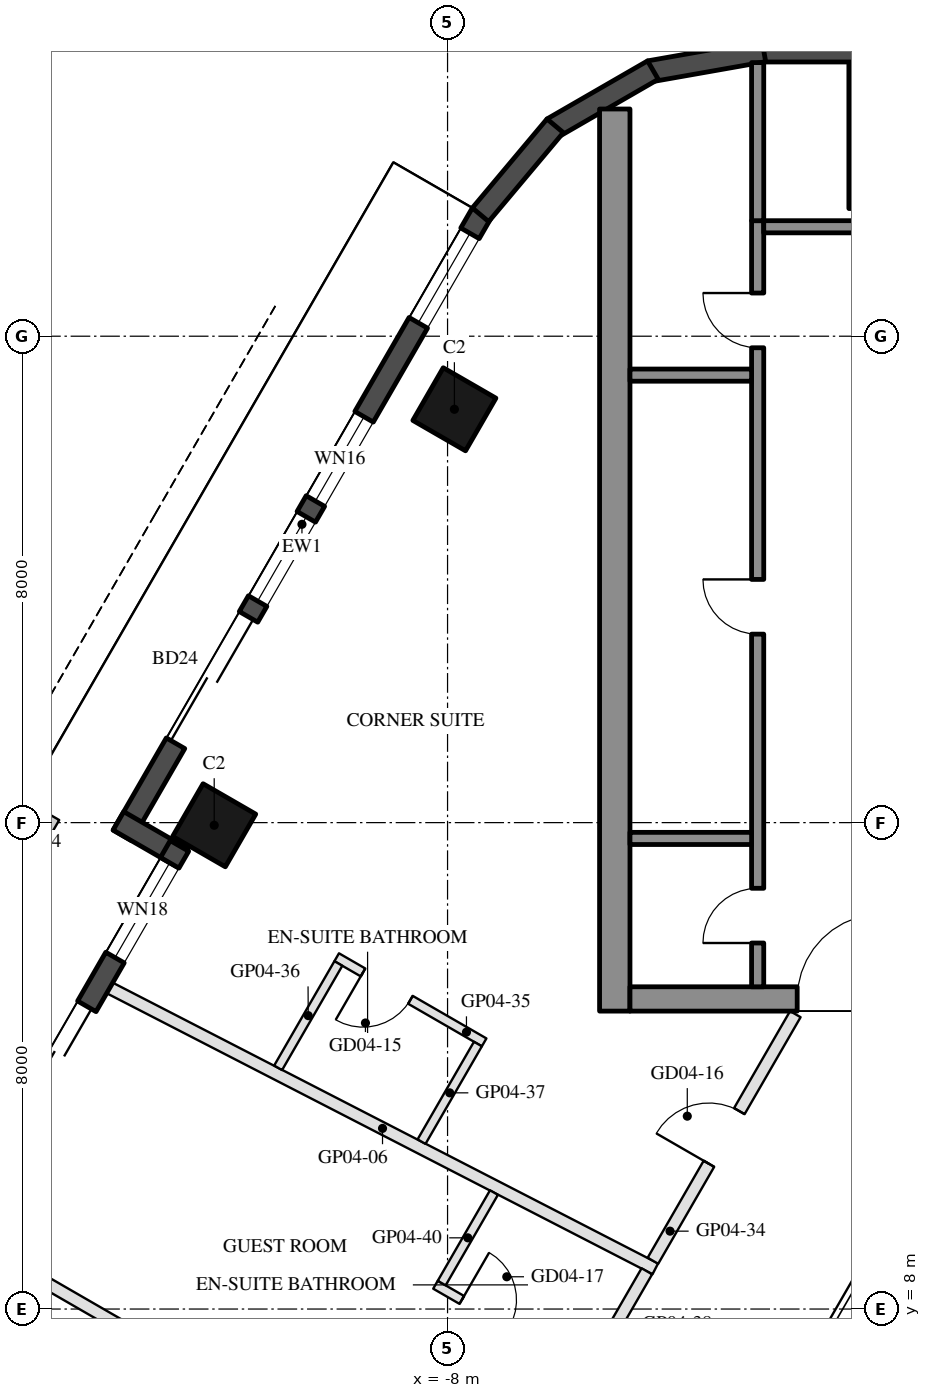
"""IFC4 building model, lengths in metres.
Left out: names, types, materials, properties, quantities, classifications, styles, units other than length and angle.
Written with IfcOpenShell. Run it as: python <this file> out.ifc"""

import sys

from ifc_helpers import new_model, si_unit, direction, frame, frame_2d, origin, origin_2d, place, context, subcontext, project, spatial, rectangle, hollow_rectangle, extrude, element, fill, save


model = new_model("IFC4")
c1 = context("Model", 3, precision=1e-05, world=origin(), true_north=direction((0.0, 1.0)))
c2 = subcontext(c1, "Body", "Model", "MODEL_VIEW")
j1 = project(units=[si_unit("LENGTHUNIT", "METRE"), si_unit("PLANEANGLEUNIT", "RADIAN")], contexts=[c1])
p1 = place(None, origin())
s1 = spatial("IfcSite", under=j1, at=p1, CompositionType="ELEMENT")
p2 = place(p1, origin())
s2 = spatial("IfcBuilding", under=s1, at=p2, CompositionType="ELEMENT")
p3 = place(p2, frame((0.0, 0.0, 72.4)))
s3 = spatial("IfcBuildingStorey", under=s2, at=p3, CompositionType="ELEMENT", Elevation=72.4)
for number, where, z_axis, x_axis in (
    (1, (-7.888, 22.798, 0.0), (0.0, 0.0, 1.0), (0.5, 0.866, 0.0)),
    (2, (-11.838, 15.957, 0.0), (0.0, 0.0, 1.0), (0.5, 0.866, 0.0)),
):
    element("IfcColumn", number, at=place(p3, frame(where, z_axis=z_axis, x_axis=x_axis)), inside=s3, PredefinedType="COLUMN", context=c2, shape_type="SweptSolid", body=[
        extrude(hollow_rectangle(XDim=1.0, YDim=1.0, WallThickness=0.045, at=origin_2d()), origin(), (0.0, 0.0, 1.0), 3.7),
    ])
p4 = place(p3, frame((0.0, 27.3, 0.0), z_axis=(0.0, 0.0, 1.0), x_axis=(1.0, 0.0, 0.0)))
e3 = element("IfcColumn", 3, at=p4, inside=s3, PredefinedType="COLUMN", context=c2, shape_type="SweptSolid", body=[
    extrude(hollow_rectangle(XDim=2.8, YDim=2.4, WallThickness=0.07, at=origin_2d()), origin(), (0.0, 0.0, 1.0), 3.7),
])
p5 = place(p3, frame((-7.441, 26.022, 0.0), z_axis=(0.0, 0.0, 1.0), x_axis=(-0.499992533062, -0.86602971478, 0.0)))
e4 = element("IfcWall", 4, at=p5, inside=s3, PredefinedType="SOLIDWALL", context=c2, shape_type="SweptSolid", body=[
    extrude(rectangle(XDim=11.816, YDim=0.35, at=frame_2d((5.908, 0.0))), origin(), (0.0, 0.0, 1.0), 3.55),
])
p6 = place(p5, frame((0.381, 0.0, 0.3)))
e5 = element("IfcOpeningElement", 5, at=p6, cuts=e4, PredefinedType="OPENING", context=c2, shape_type="SweptSolid", body=[
    extrude(rectangle(XDim=1.7, YDim=2.65, at=frame_2d((0.85, 1.325))), frame((0.0, 0.185, 0.0), z_axis=(0.0, -1.0, 0.0), x_axis=(1.0, 0.0, 0.0)), (0.0, 0.0, 1.0), 0.37),
])
p7 = place(p5, frame((7.666, 0.0, 0.0)))
e6 = element("IfcOpeningElement", 6, at=p7, cuts=e4, PredefinedType="OPENING", context=c2, shape_type="SweptSolid", body=[
    extrude(rectangle(XDim=2.4, YDim=2.4, at=frame_2d((1.2, 1.2))), frame((0.0, 0.185, 0.0), z_axis=(0.0, -1.0, 0.0), x_axis=(1.0, 0.0, 0.0)), (0.0, 0.0, 1.0), 0.37),
])
p8 = place(p5, frame((3.865, 0.0, 0.3)))
e7 = element("IfcOpeningElement", 7, at=p8, cuts=e4, PredefinedType="OPENING", context=c2, shape_type="SweptSolid", body=[
    extrude(rectangle(XDim=1.6, YDim=2.65, at=frame_2d((0.8, 1.325))), frame((0.0, 0.185, 0.0), z_axis=(0.0, -1.0, 0.0), x_axis=(1.0, 0.0, 0.0)), (0.0, 0.0, 1.0), 0.37),
])
p9 = place(p5, frame((5.765, 0.0, 0.3)))
e8 = element("IfcOpeningElement", 8, at=p9, cuts=e4, PredefinedType="OPENING", context=c2, shape_type="SweptSolid", body=[
    extrude(rectangle(XDim=1.6, YDim=2.65, at=frame_2d((0.8, 1.325))), frame((0.0, 0.185, 0.0), z_axis=(0.0, -1.0, 0.0), x_axis=(1.0, 0.0, 0.0)), (0.0, 0.0, 1.0), 0.37),
])
p10 = place(p3, frame((-13.413, 16.029, 0.0), z_axis=(0.0, 0.0, 1.0), x_axis=(0.866005645448, -0.500034220881, 0.0)))
e9 = element("IfcWall", 9, at=p10, inside=s3, PredefinedType="SOLIDWALL", context=c2, shape_type="SweptSolid", body=[
    extrude(rectangle(XDim=1.22, YDim=0.35, at=frame_2d((0.61, 0.0))), origin(), (0.0, 0.0, 1.0), 3.55),
])
p11 = place(p3, frame((-12.409, 15.617, 0.0), z_axis=(0.0, 0.0, 1.0), x_axis=(-0.500003597184, -0.866023326939, 0.0)))
e10 = element("IfcWall", 10, at=p11, inside=s3, PredefinedType="SOLIDWALL", context=c2, shape_type="SweptSolid", body=[
    extrude(rectangle(XDim=6.74, YDim=0.35, at=frame_2d((3.37, 0.0))), origin(), (0.0, 0.0, 1.0), 3.55),
])
p12 = place(p11, frame((0.32, 0.0, 0.3)))
e11 = element("IfcOpeningElement", 11, at=p12, cuts=e10, PredefinedType="OPENING", context=c2, shape_type="SweptSolid", body=[
    extrude(rectangle(XDim=1.8, YDim=2.65, at=frame_2d((0.9, 1.325))), frame((0.0, 0.185, 0.0), z_axis=(0.0, -1.0, 0.0), x_axis=(1.0, 0.0, 0.0)), (0.0, 0.0, 1.0), 0.37),
])
p13 = place(p11, frame((3.047, 0.0, 0.0)))
e12 = element("IfcOpeningElement", 12, at=p13, cuts=e10, PredefinedType="OPENING", context=c2, shape_type="SweptSolid", body=[
    extrude(rectangle(XDim=1.8, YDim=2.4, at=frame_2d((0.9, 1.2))), frame((0.0, 0.185, 0.0), z_axis=(0.0, -1.0, 0.0), x_axis=(1.0, 0.0, 0.0)), (0.0, 0.0, 1.0), 0.37),
])
p14 = place(p11, frame((5.147, 0.0, 0.3)))
e13 = element("IfcOpeningElement", 13, at=p14, cuts=e10, PredefinedType="OPENING", context=c2, shape_type="SweptSolid", body=[
    extrude(rectangle(XDim=0.8, YDim=2.65, at=frame_2d((0.4, 1.325))), frame((0.0, 0.185, 0.0), z_axis=(0.0, -1.0, 0.0), x_axis=(1.0, 0.0, 0.0)), (0.0, 0.0, 1.0), 0.37),
])
p15 = place(p3, frame((2.829, 28.685, 0.0), z_axis=(0.0, 0.0, 1.0), x_axis=(-1.0, 0.0, 0.0)))
e14 = element("IfcWall", 14, at=p15, inside=s3, PredefinedType="SOLIDWALL", context=c2, shape_type="SweptSolid", body=[
    extrude(rectangle(XDim=5.658, YDim=0.35, at=frame_2d((2.829, 0.0))), origin(), (0.0, 0.0, 1.0), 3.55),
])
for number, where, z_axis, x_axis in (
    (15, (-2.799, 28.688, 0.0), (0.0, 0.0, 1.0), (-0.985, -0.174, 0.0)),
    (16, (-4.623, 28.377, 0.0), (0.0, 0.0, 1.0), (-0.866, -0.5, 0.0)),
):
    element("IfcWall", number, at=place(p3, frame(where, z_axis=z_axis, x_axis=x_axis)), inside=s3, PredefinedType="SOLIDWALL", context=c2, shape_type="SweptSolid", body=[
        extrude(rectangle(XDim=1.91, YDim=0.35, at=frame_2d((0.955, 0.0))), origin(), (0.0, 0.0, 1.0), 3.55),
    ])
p16 = place(p3, frame((-6.23, 27.461, 0.0), z_axis=(0.0, 0.0, 1.0), x_axis=(-0.642808304945, -0.766027077259, 0.0)))
e17 = element("IfcWall", 17, at=p16, inside=s3, PredefinedType="SOLIDWALL", context=c2, shape_type="SweptSolid", body=[
    extrude(rectangle(XDim=1.91, YDim=0.35, at=frame_2d((0.955, 0.0))), origin(), (0.0, 0.0, 1.0), 3.55),
])
p17 = place(p3, frame((-5.25, 12.9, 0.0), z_axis=(0.0, 0.0, 1.0), x_axis=(0.0, 1.0, 0.0)))
e18 = element("IfcWall", 18, at=p17, inside=s3, PredefinedType="SHEAR", context=c2, shape_type="SweptSolid", body=[
    extrude(rectangle(XDim=14.837, YDim=0.5, at=frame_2d((7.418, 0.0))), origin(), (0.0, 0.0, 1.0), 3.5),
])
p18 = place(p3, frame((5.0, 13.1, 0.0), z_axis=(0.0, 0.0, 1.0), x_axis=(-1.0, 0.0, 0.0)))
e19 = element("IfcWall", 19, at=p18, inside=s3, PredefinedType="SHEAR", context=c2, shape_type="SweptSolid", body=[
    extrude(rectangle(XDim=10.0, YDim=0.4, at=frame_2d((5.0, 0.0))), origin(), (0.0, 0.0, 1.0), 3.5),
])
p19 = place(p18, frame((3.55, 0.0, 0.0)))
e20 = element("IfcOpeningElement", 20, at=p19, cuts=e19, PredefinedType="OPENING", context=c2, shape_type="SweptSolid", body=[
    extrude(rectangle(XDim=1.1, YDim=2.1, at=frame_2d((0.55, 1.05))), frame((0.0, 0.21, 0.0), z_axis=(0.0, -1.0, 0.0), x_axis=(1.0, 0.0, 0.0)), (0.0, 0.0, 1.0), 0.42),
])
p20 = place(p18, frame((5.85, 0.0, 0.0)))
e21 = element("IfcOpeningElement", 21, at=p20, cuts=e19, PredefinedType="OPENING", context=c2, shape_type="SweptSolid", body=[
    extrude(rectangle(XDim=1.4, YDim=2.1, at=frame_2d((0.7, 1.05))), frame((0.0, 0.21, 0.0), z_axis=(0.0, -1.0, 0.0), x_axis=(1.0, 0.0, 0.0)), (0.0, 0.0, 1.0), 0.42),
])
p21 = place(p3, frame((-2.9, 13.3, 0.0), z_axis=(0.0, 0.0, 1.0), x_axis=(0.0, 1.0, 0.0)))
e22 = element("IfcWall", 22, at=p21, inside=s3, PredefinedType="SHEAR", context=c2, shape_type="SweptSolid", body=[
    extrude(rectangle(XDim=12.6, YDim=0.2, at=frame_2d((6.3, 0.0))), origin(), (0.0, 0.0, 1.0), 3.5),
])
p22 = place(p21, frame((0.72, 0.0, 0.0)))
e23 = element("IfcOpeningElement", 23, at=p22, cuts=e22, PredefinedType="OPENING", context=c2, shape_type="SweptSolid", body=[
    extrude(rectangle(XDim=0.9, YDim=2.1, at=frame_2d((0.45, 1.05))), frame((0.0, 0.11, 0.0), z_axis=(0.0, -1.0, 0.0), x_axis=(1.0, 0.0, 0.0)), (0.0, 0.0, 1.0), 0.22),
])
p23 = place(p21, frame((5.8, 0.0, 0.0)))
e24 = element("IfcOpeningElement", 24, at=p23, cuts=e22, PredefinedType="OPENING", context=c2, shape_type="SweptSolid", body=[
    extrude(rectangle(XDim=0.9, YDim=2.1, at=frame_2d((0.45, 1.05))), frame((0.0, 0.11, 0.0), z_axis=(0.0, -1.0, 0.0), x_axis=(1.0, 0.0, 0.0)), (0.0, 0.0, 1.0), 0.22),
])
p24 = place(p21, frame((10.51, 0.0, 0.0)))
e25 = element("IfcOpeningElement", 25, at=p24, cuts=e22, PredefinedType="OPENING", context=c2, shape_type="SweptSolid", body=[
    extrude(rectangle(XDim=0.9, YDim=2.1, at=frame_2d((0.45, 1.05))), frame((0.0, 0.11, 0.0), z_axis=(0.0, -1.0, 0.0), x_axis=(1.0, 0.0, 0.0)), (0.0, 0.0, 1.0), 0.22),
])
p25 = place(p3, frame((-0.4, 25.8, 0.0), z_axis=(0.0, 0.0, 1.0), x_axis=(-1.0, 0.0, 0.0)))
e26 = element("IfcWall", 26, at=p25, inside=s3, PredefinedType="SHEAR", context=c2, shape_type="SweptSolid", body=[
    extrude(rectangle(XDim=2.4, YDim=0.2, at=frame_2d((1.2, 0.0))), origin(), (0.0, 0.0, 1.0), 3.5),
])
for number, where, z_axis, x_axis in (
    (27, (-3.0, 15.74, 0.0), (0.0, 0.0, 1.0), (-1.0, 0.0, 0.0)),
    (28, (-3.0, 23.36, 0.0), (0.0, 0.0, 1.0), (-1.0, 0.0, 0.0)),
):
    element("IfcWall", number, at=place(p3, frame(where, z_axis=z_axis, x_axis=x_axis)), inside=s3, PredefinedType="SHEAR", context=c2, shape_type="SweptSolid", body=[
        extrude(rectangle(XDim=2.0, YDim=0.2, at=frame_2d((1.0, 0.0))), origin(), (0.0, 0.0, 1.0), 3.5),
    ])
p26 = place(p3, frame((-2.9, 25.9, 0.0), z_axis=(0.0, 0.0, 1.0), x_axis=(0.0, 1.0, 0.0)))
e29 = element("IfcWall", 29, at=p26, inside=s3, PredefinedType="SHEAR", context=c2, shape_type="SweptSolid", body=[
    extrude(rectangle(XDim=2.6, YDim=0.2, at=frame_2d((1.3, 0.0))), origin(), (0.0, 0.0, 1.0), 3.5),
])
p27 = place(p3, frame((-13.556, 13.281, 0.0), z_axis=(0.0, 0.0, 1.0), x_axis=(0.889110909618, -0.457691807223, 0.0)))
e30 = element("IfcWall", 30, at=p27, inside=s3, PredefinedType="PARTITIONING", context=c2, shape_type="SweptSolid", body=[
    extrude(rectangle(XDim=10.092, YDim=0.2, at=frame_2d((5.046, 0.0))), origin(), (0.0, 0.0, 1.0), 2.96),
])
p28 = place(p3, frame((-15.354, 8.865, 0.0), z_axis=(0.0, 0.0, 1.0), x_axis=(0.866018301787, -0.500012300819, 0.0)))
e31 = element("IfcWall", 31, at=p28, inside=s3, PredefinedType="PARTITIONING", context=c2, shape_type="SweptSolid", body=[
    extrude(rectangle(XDim=9.43, YDim=0.2, at=frame_2d((4.715, 0.0))), origin(), (0.0, 0.0, 1.0), 2.95),
])
p29 = place(p3, frame((-4.622, 8.794, 0.0), z_axis=(0.0, 0.0, 1.0), x_axis=(0.499979668266, 0.866037141998, 0.0)))
e32 = element("IfcWall", 32, at=p29, inside=s3, PredefinedType="PARTITIONING", context=c2, shape_type="SweptSolid", body=[
    extrude(rectangle(XDim=4.683, YDim=0.2, at=frame_2d((2.342, 0.0))), origin(), (0.0, 0.0, 1.0), 2.95),
])
p30 = place(p29, frame((1.842, 0.0, 0.0)))
e33 = element("IfcOpeningElement", 33, at=p30, cuts=e32, PredefinedType="OPENING", context=c2, shape_type="SweptSolid", body=[
    extrude(rectangle(XDim=1.0, YDim=2.1, at=frame_2d((0.5, 1.05))), frame((0.0, 0.11, 0.0), z_axis=(0.0, -1.0, 0.0), x_axis=(1.0, 0.0, 0.0)), (0.0, 0.0, 1.0), 0.22),
])
p31 = place(p3, frame((-7.398, 12.386, 0.0), z_axis=(0.0, 0.0, 1.0), x_axis=(-0.866034573852, 0.49998411664, 0.0)))
e34 = element("IfcWall", 34, at=p31, inside=s3, PredefinedType="PARTITIONING", context=c2, shape_type="SweptSolid", body=[
    extrude(rectangle(XDim=2.8, YDim=0.15, at=frame_2d((1.4, 0.0))), origin(), (0.0, 0.0, 1.0), 3.55),
])
p32 = place(p31, frame((1.4, 0.0, 0.0)))
e35 = element("IfcOpeningElement", 35, at=p32, cuts=e34, PredefinedType="OPENING", context=c2, shape_type="SweptSolid", body=[
    extrude(rectangle(XDim=0.9, YDim=2.1, at=frame_2d((0.45, 1.05))), frame((0.0, 0.085, 0.0), z_axis=(0.0, -1.0, 0.0), x_axis=(1.0, 0.0, 0.0)), (0.0, 0.0, 1.0), 0.17),
])
p33 = place(p3, frame((-9.796, 13.683, 0.0), z_axis=(0.0, 0.0, 1.0), x_axis=(-0.499981976687, -0.866035809299, 0.0)))
e36 = element("IfcWall", 36, at=p33, inside=s3, PredefinedType="PARTITIONING", context=c2, shape_type="SweptSolid", body=[
    extrude(rectangle(XDim=1.981, YDim=0.15, at=frame_2d((0.991, 0.0))), origin(), (0.0, 0.0, 1.0), 3.55),
])
p34 = place(p3, frame((-7.501, 12.358, 0.0), z_axis=(0.0, 0.0, 1.0), x_axis=(-0.499992292652, -0.866029853578, 0.0)))
e37 = element("IfcWall", 37, at=p34, inside=s3, PredefinedType="PARTITIONING", context=c2, shape_type="SweptSolid", body=[
    extrude(rectangle(XDim=1.854, YDim=0.15, at=frame_2d((0.927, 0.0))), origin(), (0.0, 0.0, 1.0), 3.55),
])
p35 = place(p3, frame((-7.225, 4.287, 0.0), z_axis=(0.0, 0.0, 1.0), x_axis=(0.49997441339, 0.866040175716, 0.0)))
e38 = element("IfcWall", 38, at=p35, inside=s3, PredefinedType="PARTITIONING", context=c2, shape_type="SweptSolid", body=[
    extrude(rectangle(XDim=5.005, YDim=0.2, at=frame_2d((2.502, 0.0))), origin(), (0.0, 0.0, 1.0), 2.95),
])
p36 = place(p35, frame((1.55, 0.0, 0.0)))
e39 = element("IfcOpeningElement", 39, at=p36, cuts=e38, PredefinedType="OPENING", context=c2, shape_type="SweptSolid", body=[
    extrude(rectangle(XDim=1.0, YDim=2.1, at=frame_2d((0.5, 1.05))), frame((0.0, 0.11, 0.0), z_axis=(0.0, -1.0, 0.0), x_axis=(1.0, 0.0, 0.0)), (0.0, 0.0, 1.0), 0.22),
])
p37 = place(p3, frame((-8.198, 8.399, 0.0), z_axis=(0.0, 0.0, 1.0), x_axis=(0.866034573852, -0.49998411664, 0.0)))
e40 = element("IfcWall", 40, at=p37, inside=s3, PredefinedType="PARTITIONING", context=c2, shape_type="SweptSolid", body=[
    extrude(rectangle(XDim=2.8, YDim=0.15, at=frame_2d((1.4, 0.0))), origin(), (0.0, 0.0, 1.0), 3.55),
])
p38 = place(p37, frame((0.5, 0.0, 0.0)))
e41 = element("IfcOpeningElement", 41, at=p38, cuts=e40, PredefinedType="OPENING", context=c2, shape_type="SweptSolid", body=[
    extrude(rectangle(XDim=0.9, YDim=2.1, at=frame_2d((0.45, 1.05))), frame((0.0, 0.085, 0.0), z_axis=(0.0, -1.0, 0.0), x_axis=(1.0, 0.0, 0.0)), (0.0, 0.0, 1.0), 0.17),
])
p39 = place(p3, frame((-7.237, 9.915, 0.0), z_axis=(0.0, 0.0, 1.0), x_axis=(-0.50005036918, -0.865996321171, 0.0)))
e42 = element("IfcWall", 42, at=p39, inside=s3, PredefinedType="PARTITIONING", context=c2, shape_type="SweptSolid", body=[
    extrude(rectangle(XDim=1.719, YDim=0.15, at=frame_2d((0.859, 0.0))), origin(), (0.0, 0.0, 1.0), 2.95),
])
p40 = place(p6, origin())
e43 = element("IfcWindow", 43, at=p40, inside=s3, PartitioningType="SINGLE_PANEL", PredefinedType="WINDOW", context=c2, shape_type="SweptSolid", body=[
    extrude(rectangle(XDim=1.7, YDim=2.65, at=frame_2d((0.85, 1.325))), frame((0.0, 0.03, 0.0), z_axis=(0.0, -1.0, 0.0), x_axis=(1.0, 0.0, 0.0)), (0.0, 0.0, 1.0), 0.06),
])
fill(e5, e43)
p41 = place(p7, frame((2.4, 0.0, 0.0), z_axis=(0.0, 0.0, 1.0), x_axis=(-1.0, 0.0, 0.0)))
e44 = element("IfcDoor", 44, at=p41, inside=s3, OperationType="SLIDING_TO_LEFT", PredefinedType="DOOR", context=c2, shape_type="SweptSolid", body=[
    extrude(rectangle(XDim=2.4, YDim=2.4, at=frame_2d((1.2, 1.2))), frame((0.0, 0.025, 0.0), z_axis=(0.0, -1.0, 0.0), x_axis=(1.0, 0.0, 0.0)), (0.0, 0.0, 1.0), 0.05),
])
fill(e6, e44)
p42 = place(p8, origin())
e45 = element("IfcWindow", 45, at=p42, inside=s3, PartitioningType="SINGLE_PANEL", PredefinedType="WINDOW", context=c2, shape_type="SweptSolid", body=[
    extrude(rectangle(XDim=1.6, YDim=2.65, at=frame_2d((0.8, 1.325))), frame((0.0, 0.03, 0.0), z_axis=(0.0, -1.0, 0.0), x_axis=(1.0, 0.0, 0.0)), (0.0, 0.0, 1.0), 0.06),
])
fill(e7, e45)
p43 = place(p9, origin())
e46 = element("IfcWindow", 46, at=p43, inside=s3, PartitioningType="SINGLE_PANEL", PredefinedType="WINDOW", context=c2, shape_type="SweptSolid", body=[
    extrude(rectangle(XDim=1.6, YDim=2.65, at=frame_2d((0.8, 1.325))), frame((0.0, 0.03, 0.0), z_axis=(0.0, -1.0, 0.0), x_axis=(1.0, 0.0, 0.0)), (0.0, 0.0, 1.0), 0.06),
])
fill(e8, e46)
p44 = place(p12, origin())
e47 = element("IfcWindow", 47, at=p44, inside=s3, PartitioningType="SINGLE_PANEL", PredefinedType="WINDOW", context=c2, shape_type="SweptSolid", body=[
    extrude(rectangle(XDim=1.8, YDim=2.65, at=frame_2d((0.9, 1.325))), frame((0.0, 0.03, 0.0), z_axis=(0.0, -1.0, 0.0), x_axis=(1.0, 0.0, 0.0)), (0.0, 0.0, 1.0), 0.06),
])
fill(e11, e47)
p45 = place(p13, frame((1.8, 0.0, 0.0), z_axis=(0.0, 0.0, 1.0), x_axis=(-1.0, 0.0, 0.0)))
e48 = element("IfcDoor", 48, at=p45, inside=s3, OperationType="SLIDING_TO_LEFT", PredefinedType="DOOR", context=c2, shape_type="SweptSolid", body=[
    extrude(rectangle(XDim=1.8, YDim=2.4, at=frame_2d((0.9, 1.2))), frame((0.0, 0.025, 0.0), z_axis=(0.0, -1.0, 0.0), x_axis=(1.0, 0.0, 0.0)), (0.0, 0.0, 1.0), 0.05),
])
fill(e12, e48)
p46 = place(p22, origin())
e49 = element("IfcDoor", 49, at=p46, inside=s3, OperationType="SINGLE_SWING_LEFT", PredefinedType="DOOR", context=c2, shape_type="SweptSolid", body=[
    extrude(rectangle(XDim=0.9, YDim=2.1, at=frame_2d((0.45, 1.05))), frame((0.0, 0.025, 0.0), z_axis=(0.0, -1.0, 0.0), x_axis=(1.0, 0.0, 0.0)), (0.0, 0.0, 1.0), 0.05),
])
fill(e23, e49)
p47 = place(p23, origin())
e50 = element("IfcDoor", 50, at=p47, inside=s3, OperationType="SINGLE_SWING_RIGHT", PredefinedType="DOOR", context=c2, shape_type="SweptSolid", body=[
    extrude(rectangle(XDim=0.9, YDim=2.1, at=frame_2d((0.45, 1.05))), frame((0.0, 0.025, 0.0), z_axis=(0.0, -1.0, 0.0), x_axis=(1.0, 0.0, 0.0)), (0.0, 0.0, 1.0), 0.05),
])
fill(e24, e50)
p48 = place(p24, origin())
e51 = element("IfcDoor", 51, at=p48, inside=s3, OperationType="SINGLE_SWING_RIGHT", PredefinedType="DOOR", context=c2, shape_type="SweptSolid", body=[
    extrude(rectangle(XDim=0.9, YDim=2.1, at=frame_2d((0.45, 1.05))), frame((0.0, 0.025, 0.0), z_axis=(0.0, -1.0, 0.0), x_axis=(1.0, 0.0, 0.0)), (0.0, 0.0, 1.0), 0.05),
])
fill(e25, e51)
p49 = place(p20, frame((1.4, 0.0, 0.0), z_axis=(0.0, 0.0, 1.0), x_axis=(-1.0, 0.0, 0.0)))
e52 = element("IfcDoor", 52, at=p49, inside=s3, OperationType="DOUBLE_DOOR_SINGLE_SWING", PredefinedType="DOOR", context=c2, shape_type="SweptSolid", body=[
    extrude(rectangle(XDim=1.4, YDim=2.1, at=frame_2d((0.7, 1.05))), frame((0.0, 0.025, 0.0), z_axis=(0.0, -1.0, 0.0), x_axis=(1.0, 0.0, 0.0)), (0.0, 0.0, 1.0), 0.05),
])
fill(e21, e52)
p50 = place(p32, origin())
e53 = element("IfcDoor", 53, at=p50, inside=s3, OperationType="SINGLE_SWING_RIGHT", PredefinedType="DOOR", context=c2, shape_type="SweptSolid", body=[
    extrude(rectangle(XDim=0.9, YDim=2.1, at=frame_2d((0.45, 1.05))), frame((0.0, 0.025, 0.0), z_axis=(0.0, -1.0, 0.0), x_axis=(1.0, 0.0, 0.0)), (0.0, 0.0, 1.0), 0.05),
])
fill(e35, e53)
p51 = place(p30, origin())
e54 = element("IfcDoor", 54, at=p51, inside=s3, OperationType="SINGLE_SWING_LEFT", PredefinedType="DOOR", context=c2, shape_type="SweptSolid", body=[
    extrude(rectangle(XDim=1.0, YDim=2.1, at=frame_2d((0.5, 1.05))), frame((0.0, 0.025, 0.0), z_axis=(0.0, -1.0, 0.0), x_axis=(1.0, 0.0, 0.0)), (0.0, 0.0, 1.0), 0.05),
])
fill(e33, e54)
p52 = place(p38, origin())
e55 = element("IfcDoor", 55, at=p52, inside=s3, OperationType="SINGLE_SWING_LEFT", PredefinedType="DOOR", context=c2, shape_type="SweptSolid", body=[
    extrude(rectangle(XDim=0.9, YDim=2.1, at=frame_2d((0.45, 1.05))), frame((0.0, 0.025, 0.0), z_axis=(0.0, -1.0, 0.0), x_axis=(1.0, 0.0, 0.0)), (0.0, 0.0, 1.0), 0.05),
])
fill(e41, e55)
save(model, sys.argv[1])
